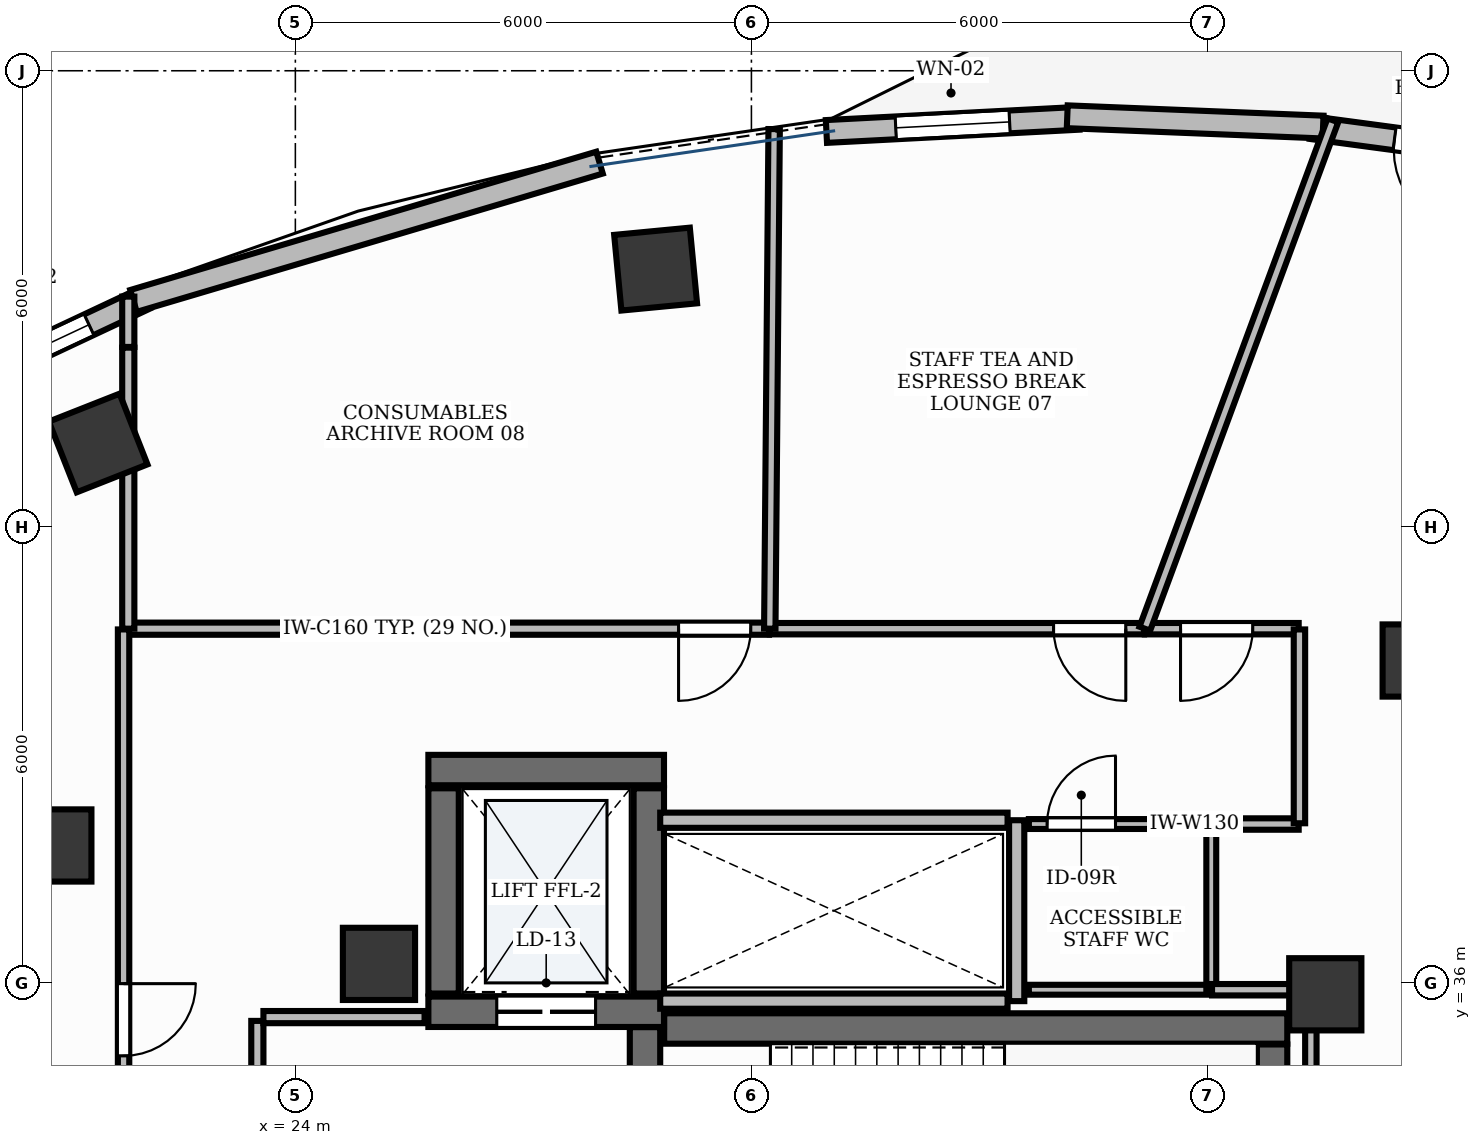
"""IFC4 building model, lengths in metres.
Left out: names, types, materials, properties, quantities, classifications, styles, units other than length and angle.
Written with IfcOpenShell. Run it as: python <this file> out.ifc"""

import sys

from ifc_helpers import new_model, si_unit, direction, frame, frame_2d, origin, origin_2d, place, context, subcontext, project, spatial, rectangle, extrude, element, fill, save


model = new_model("IFC4")
c1 = context("Model", 3, precision=1e-05, world=origin(), true_north=direction((0.0, 1.0)))
c2 = subcontext(c1, "Body", "Model", "MODEL_VIEW")
j1 = project(units=[si_unit("LENGTHUNIT", "METRE"), si_unit("PLANEANGLEUNIT", "RADIAN")], contexts=[c1])
p1 = place(None, origin())
s1 = spatial("IfcSite", under=j1, at=p1, CompositionType="ELEMENT")
p2 = place(p1, origin())
s2 = spatial("IfcBuilding", under=s1, at=p2, CompositionType="ELEMENT")
p3 = place(p2, frame((0.0, 0.0, 183.6)))
s3 = spatial("IfcBuildingStorey", under=s2, at=p3, CompositionType="ELEMENT", Elevation=183.6)
p4 = place(p3, frame((28.852, 35.4, 0.0), z_axis=(0.0, 0.0, 1.0), x_axis=(1.0, 0.0, 0.0)))
e1 = element("IfcWall", 1, at=p4, inside=s3, PredefinedType="SHEAR", context=c2, shape_type="SweptSolid", body=[
    extrude(rectangle(XDim=8.198, YDim=0.4, at=frame_2d((4.099, 0.0))), origin(), (0.0, 0.0, 1.0), 3.9),
])
p5 = place(p3, frame((36.85, 32.11, 0.0), z_axis=(0.0, 0.0, 1.0), x_axis=(0.0, 1.0, 0.0)))
e2 = element("IfcWall", 2, at=p5, inside=s3, PredefinedType="SHEAR", context=c2, shape_type="SweptSolid", body=[
    extrude(rectangle(XDim=3.08, YDim=0.4, at=frame_2d((1.54, 0.0))), origin(), (0.0, 0.0, 1.0), 3.9),
])
p6 = place(p3, frame((28.6, 32.11, 0.0), z_axis=(0.0, 0.0, 1.0), x_axis=(0.0, 1.0, 0.0)))
e3 = element("IfcWall", 3, at=p6, inside=s3, PredefinedType="SHEAR", context=c2, shape_type="SweptSolid", body=[
    extrude(rectangle(XDim=3.308, YDim=0.4, at=frame_2d((1.654, 0.0))), origin(), (0.0, 0.0, 1.0), 3.9),
])
p7 = place(p6, frame((0.2, 0.0, 0.0)))
e4 = element("IfcOpeningElement", 4, at=p7, cuts=e3, PredefinedType="OPENING", context=c2, shape_type="SweptSolid", body=[
    extrude(rectangle(XDim=1.05, YDim=2.15, at=frame_2d((0.525, 1.075))), frame((0.0, 0.215, 0.0), z_axis=(0.0, -1.0, 0.0), x_axis=(1.0, 0.0, 0.0)), (0.0, 0.0, 1.0), 0.43),
])
p8 = place(p3, frame((25.75, 38.8, 0.0), z_axis=(0.0, 0.0, 1.0), x_axis=(1.0, 0.0, 0.0)))
e5 = element("IfcWall", 5, at=p8, inside=s3, PredefinedType="SHEAR", context=c2, shape_type="SweptSolid", body=[
    extrude(rectangle(XDim=3.1, YDim=0.4, at=frame_2d((1.55, 0.0))), origin(), (0.0, 0.0, 1.0), 3.9),
])
p9 = place(p3, frame((25.75, 35.62, 0.0), z_axis=(0.0, 0.0, 1.0), x_axis=(1.0, 0.0, 0.0)))
e6 = element("IfcWall", 6, at=p9, inside=s3, PredefinedType="SHEAR", context=c2, shape_type="SweptSolid", body=[
    extrude(rectangle(XDim=3.1, YDim=0.4, at=frame_2d((1.55, 0.0))), origin(), (0.0, 0.0, 1.0), 3.9),
])
p10 = place(p9, frame((0.9, 0.0, 0.0)))
e7 = element("IfcOpeningElement", 7, at=p10, cuts=e6, PredefinedType="OPENING", context=c2, shape_type="SweptSolid", body=[
    extrude(rectangle(XDim=1.3, YDim=2.2, at=frame_2d((0.65, 1.1))), frame((0.0, 0.215, 0.0), z_axis=(0.0, -1.0, 0.0), x_axis=(1.0, 0.0, 0.0)), (0.0, 0.0, 1.0), 0.43),
])
for number, where, z_axis, x_axis in (
    (8, (25.95, 35.86, 0.0), (0.0, 0.0, 1.0), (0.0, 1.0, 0.0)),
    (9, (28.65, 35.86, 0.0), (0.0, 0.0, 1.0), (0.0, 1.0, 0.0)),
):
    element("IfcWall", number, at=place(p3, frame(where, z_axis=z_axis, x_axis=x_axis)), inside=s3, PredefinedType="SHEAR", context=c2, shape_type="SweptSolid", body=[
        extrude(rectangle(XDim=2.7, YDim=0.4, at=frame_2d((1.35, 0.0))), origin(), (0.0, 0.0, 1.0), 3.9),
    ])
for number, where, z_axis, x_axis in (
    (10, (37.55, 35.85, -0.0), (0.0, 0.0, 1.0), (1.0, 0.0, 0.0)),
    (11, (25.1, 36.25, -0.0), (0.0, 0.0, 1.0), (1.0, 0.0, 0.0)),
):
    element("IfcColumn", number, at=place(p3, frame(where, z_axis=z_axis, x_axis=x_axis)), inside=s3, PredefinedType="PILASTER", context=c2, shape_type="SweptSolid", body=[
        extrude(rectangle(XDim=0.95, YDim=0.95, at=origin_2d()), origin(), (0.0, 0.0, 1.0), 3.901),
    ])
p11 = place(p3, frame((38.779, 40.241, -0.0), z_axis=(0.0, 0.0, 1.0), x_axis=(1.0, 0.0, 0.0)))
e12 = element("IfcColumn", 12, at=p11, inside=s3, PredefinedType="COLUMN", context=c2, shape_type="SweptSolid", body=[
    extrude(rectangle(XDim=0.95, YDim=0.95, at=origin_2d()), origin(), (0.0, 0.0, 1.0), 3.901),
])
for number, where, z_axis, x_axis in (
    (13, (28.74, 45.39, -0.0), (0.0, 0.0, 1.0), (0.995, 0.095, 0.0)),
    (14, (21.406, 43.103, -0.0), (0.0, 0.0, 1.0), (0.93, 0.367, 0.0)),
):
    element("IfcColumn", number, at=place(p3, frame(where, z_axis=z_axis, x_axis=x_axis)), inside=s3, PredefinedType="COLUMN", context=c2, shape_type="SweptSolid", body=[
        extrude(rectangle(XDim=1.0, YDim=1.0, at=origin_2d()), origin(), (0.0, 0.0, 1.0), 3.901),
    ])
p12 = place(p3, frame((20.842, 37.808, -0.0), z_axis=(0.0, 0.0, 1.0), x_axis=(1.0, 0.0, 0.0)))
e15 = element("IfcColumn", 15, at=p12, inside=s3, PredefinedType="COLUMN", context=c2, shape_type="SweptSolid", body=[
    extrude(rectangle(XDim=0.95, YDim=0.95, at=origin_2d()), origin(), (0.0, 0.0, 1.0), 3.901),
])
p13 = place(p3, frame((40.646, 46.812, 0.0), z_axis=(0.0, 0.0, 1.0), x_axis=(-0.991139436205, 0.132825517122, 0.0)))
e16 = element("IfcWall", 16, at=p13, inside=s3, PredefinedType="STANDARD", context=c2, shape_type="SweptSolid", body=[
    extrude(rectangle(XDim=3.31, YDim=0.3, at=frame_2d((1.655, 0.0))), origin(), (0.0, 0.0, 1.0), 3.9),
])
p14 = place(p13, frame((1.105, 0.0, 0.0)))
e17 = element("IfcOpeningElement", 17, at=p14, cuts=e16, PredefinedType="OPENING", context=c2, shape_type="SweptSolid", body=[
    extrude(rectangle(XDim=1.1, YDim=2.15, at=frame_2d((0.55, 1.075))), frame((0.0, 0.165, 0.0), z_axis=(0.0, -1.0, 0.0), x_axis=(1.0, 0.0, 0.0)), (0.0, 0.0, 1.0), 0.33),
])
p15 = place(p3, frame((34.309, 47.375, 0.0), z_axis=(0.0, 0.0, 1.0), x_axis=(-0.998637826203, -0.05217750547, 0.0)))
e18 = element("IfcWall", 18, at=p15, inside=s3, PredefinedType="STANDARD", context=c2, shape_type="SweptSolid", body=[
    extrude(rectangle(XDim=3.327, YDim=0.3, at=frame_2d((1.664, 0.0))), origin(), (0.0, 0.0, 1.0), 3.9),
])
p16 = place(p15, frame((0.913, 0.0, 0.95)))
e19 = element("IfcOpeningElement", 19, at=p16, cuts=e18, PredefinedType="OPENING", context=c2, shape_type="SweptSolid", body=[
    extrude(rectangle(XDim=1.5, YDim=1.8, at=frame_2d((0.75, 0.9))), frame((0.0, 0.165, 0.0), z_axis=(0.0, -1.0, 0.0), x_axis=(1.0, 0.0, 0.0)), (0.0, 0.0, 1.0), 0.33),
])
p17 = place(p3, frame((22.03, 45.01, 0.0), z_axis=(0.0, 0.0, 1.0), x_axis=(-0.905013842092, -0.425382117186, 0.0)))
e20 = element("IfcWall", 20, at=p17, inside=s3, PredefinedType="STANDARD", context=c2, shape_type="SweptSolid", body=[
    extrude(rectangle(XDim=3.146, YDim=0.3, at=frame_2d((1.573, 0.0))), origin(), (0.0, 0.0, 1.0), 3.9),
])
p18 = place(p17, frame((0.823, 0.0, 0.95)))
e21 = element("IfcOpeningElement", 21, at=p18, cuts=e20, PredefinedType="OPENING", context=c2, shape_type="SweptSolid", body=[
    extrude(rectangle(XDim=1.5, YDim=1.8, at=frame_2d((0.75, 0.9))), frame((0.0, 0.165, 0.0), z_axis=(0.0, -1.0, 0.0), x_axis=(1.0, 0.0, 0.0)), (0.0, 0.0, 1.0), 0.33),
])
p19 = place(p3, frame((37.521, 47.259, 0.0), z_axis=(0.0, 0.0, 1.0), x_axis=(-0.999190386434, 0.040231475948, 0.0)))
e22 = element("IfcWall", 22, at=p19, inside=s3, PredefinedType="STANDARD", context=c2, shape_type="SweptSolid", body=[
    extrude(rectangle(XDim=3.368, YDim=0.3, at=frame_2d((1.684, 0.0))), origin(), (0.0, 0.0, 1.0), 3.9),
])
p20 = place(p3, frame((28.002, 46.791, 0.0), z_axis=(0.0, 0.0, 1.0), x_axis=(-0.958672086524, -0.284513322218, 0.0)))
e23 = element("IfcWall", 23, at=p20, inside=s3, PredefinedType="STANDARD", context=c2, shape_type="SweptSolid", body=[
    extrude(rectangle(XDim=6.396, YDim=0.3, at=frame_2d((3.198, 0.0))), origin(), (0.0, 0.0, 1.0), 3.47),
])
p21 = place(p3, frame((33.49, 35.76, 0.0), z_axis=(0.0, 0.0, 1.0), x_axis=(0.0, 1.0, 0.0)))
e24 = element("IfcWall", 24, at=p21, inside=s3, PredefinedType="PARTITIONING", context=c2, shape_type="SweptSolid", body=[
    extrude(rectangle(XDim=2.38, YDim=0.2, at=frame_2d((1.19, 0.0))), origin(), (0.0, 0.0, 1.0), 2.91),
])
for number, where, z_axis, x_axis in (
    (25, (28.8, 35.76, 0.0), (0.0, 0.0, 1.0), (1.0, 0.0, 0.0)),
    (26, (28.8, 38.14, 0.0), (0.0, 0.0, 1.0), (1.0, 0.0, 0.0)),
):
    element("IfcWall", number, at=place(p3, frame(where, z_axis=z_axis, x_axis=x_axis)), inside=s3, PredefinedType="PARTITIONING", context=c2, shape_type="SweptSolid", body=[
        extrude(rectangle(XDim=4.57, YDim=0.2, at=frame_2d((2.285, 0.0))), origin(), (0.0, 0.0, 1.0), 2.91),
    ])
p22 = place(p3, frame((23.5, 32.1, 0.0), z_axis=(0.0, 0.0, 1.0), x_axis=(0.0, 1.0, 0.0)))
e27 = element("IfcWall", 27, at=p22, inside=s3, PredefinedType="PARTITIONING", context=c2, shape_type="SweptSolid", body=[
    extrude(rectangle(XDim=3.4, YDim=0.16, at=frame_2d((1.7, 0.0))), origin(), (0.0, 0.0, 1.0), 2.91),
])
p23 = place(p22, frame((1.175, 0.0, 0.0)))
e28 = element("IfcOpeningElement", 28, at=p23, cuts=e27, PredefinedType="OPENING", context=c2, shape_type="SweptSolid", body=[
    extrude(rectangle(XDim=1.05, YDim=2.15, at=frame_2d((0.525, 1.075))), frame((0.0, 0.095, 0.0), z_axis=(0.0, -1.0, 0.0), x_axis=(1.0, 0.0, 0.0)), (0.0, 0.0, 1.0), 0.19),
])
p24 = place(p3, frame((23.58, 35.55, 0.0), z_axis=(0.0, 0.0, 1.0), x_axis=(1.0, 0.0, 0.0)))
e29 = element("IfcWall", 29, at=p24, inside=s3, PredefinedType="PARTITIONING", context=c2, shape_type="SweptSolid", body=[
    extrude(rectangle(XDim=2.12, YDim=0.16, at=frame_2d((1.06, 0.0))), origin(), (0.0, 0.0, 1.0), 2.91),
])
p25 = place(p3, frame((33.65, 38.09, 0.0), z_axis=(0.0, 0.0, 1.0), x_axis=(1.0, 0.0, 0.0)))
e30 = element("IfcWall", 30, at=p25, inside=s3, PredefinedType="PARTITIONING", context=c2, shape_type="SweptSolid", body=[
    extrude(rectangle(XDim=2.4, YDim=0.13, at=frame_2d((1.2, 0.0))), origin(), (0.0, 0.0, 1.0), 2.91),
])
p26 = place(p25, frame((0.24, 0.0, 0.0)))
e31 = element("IfcOpeningElement", 31, at=p26, cuts=e30, PredefinedType="OPENING", context=c2, shape_type="SweptSolid", body=[
    extrude(rectangle(XDim=0.9, YDim=2.15, at=frame_2d((0.45, 1.075))), frame((0.0, 0.08, 0.0), z_axis=(0.0, -1.0, 0.0), x_axis=(1.0, 0.0, 0.0)), (0.0, 0.0, 1.0), 0.16),
])
p27 = place(p3, frame((37.2, 40.66, 0.0), z_axis=(0.0, 0.0, 1.0), x_axis=(-1.0, 0.0, 0.0)))
e32 = element("IfcWall", 32, at=p27, inside=s3, PredefinedType="PARTITIONING", context=c2, shape_type="SweptSolid", body=[
    extrude(rectangle(XDim=2.024, YDim=0.15, at=frame_2d((1.012, 0.0))), origin(), (0.0, 0.0, 1.0), 2.91),
])
p28 = place(p27, frame((0.604, 0.0, 0.0)))
e33 = element("IfcOpeningElement", 33, at=p28, cuts=e32, PredefinedType="OPENING", context=c2, shape_type="SweptSolid", body=[
    extrude(rectangle(XDim=0.95, YDim=2.15, at=frame_2d((0.475, 1.075))), frame((0.0, 0.09, 0.0), z_axis=(0.0, -1.0, 0.0), x_axis=(1.0, 0.0, 0.0)), (0.0, 0.0, 1.0), 0.18),
])
p29 = place(p3, frame((35.166, 40.66, 0.0), z_axis=(0.0, 0.0, 1.0), x_axis=(-1.0, 0.0, 0.0)))
e34 = element("IfcWall", 34, at=p29, inside=s3, PredefinedType="PARTITIONING", context=c2, shape_type="SweptSolid", body=[
    extrude(rectangle(XDim=4.924, YDim=0.15, at=frame_2d((2.462, 0.0))), origin(), (0.0, 0.0, 1.0), 2.91),
])
p30 = place(p29, frame((0.24, 0.0, 0.0)))
e35 = element("IfcOpeningElement", 35, at=p30, cuts=e34, PredefinedType="OPENING", context=c2, shape_type="SweptSolid", body=[
    extrude(rectangle(XDim=0.95, YDim=2.15, at=frame_2d((0.475, 1.075))), frame((0.0, 0.09, 0.0), z_axis=(0.0, -1.0, 0.0), x_axis=(1.0, 0.0, 0.0)), (0.0, 0.0, 1.0), 0.18),
])
p31 = place(p3, frame((30.232, 40.66, 0.0), z_axis=(0.0, 0.0, 1.0), x_axis=(-1.0, 0.0, 0.0)))
e36 = element("IfcWall", 36, at=p31, inside=s3, PredefinedType="PARTITIONING", context=c2, shape_type="SweptSolid", body=[
    extrude(rectangle(XDim=8.43, YDim=0.16, at=frame_2d((4.215, 0.0))), origin(), (0.0, 0.0, 1.0), 2.91),
])
p32 = place(p31, frame((0.24, 0.0, 0.0)))
e37 = element("IfcOpeningElement", 37, at=p32, cuts=e36, PredefinedType="OPENING", context=c2, shape_type="SweptSolid", body=[
    extrude(rectangle(XDim=0.95, YDim=2.15, at=frame_2d((0.475, 1.075))), frame((0.0, 0.095, 0.0), z_axis=(0.0, -1.0, 0.0), x_axis=(1.0, 0.0, 0.0)), (0.0, 0.0, 1.0), 0.19),
])
p33 = place(p3, frame((21.74, 40.65, 0.0), z_axis=(0.0, 0.0, 1.0), x_axis=(0.0, -1.0, 0.0)))
e38 = element("IfcWall", 38, at=p33, inside=s3, PredefinedType="PARTITIONING", context=c2, shape_type="SweptSolid", body=[
    extrude(rectangle(XDim=5.85, YDim=0.15, at=frame_2d((2.925, 0.0))), origin(), (0.0, 0.0, 1.0), 2.91),
])
p34 = place(p33, frame((4.66, 0.0, 0.0)))
e39 = element("IfcOpeningElement", 39, at=p34, cuts=e38, PredefinedType="OPENING", context=c2, shape_type="SweptSolid", body=[
    extrude(rectangle(XDim=0.95, YDim=2.15, at=frame_2d((0.475, 1.075))), frame((0.0, 0.09, 0.0), z_axis=(0.0, -1.0, 0.0), x_axis=(1.0, 0.0, 0.0)), (0.0, 0.0, 1.0), 0.18),
])
p35 = place(p3, frame((36.05, 35.91, 0.0), z_axis=(0.0, 0.0, 1.0), x_axis=(-1.0, 0.0, 0.0)))
e40 = element("IfcWall", 40, at=p35, inside=s3, PredefinedType="PARTITIONING", context=c2, shape_type="SweptSolid", body=[
    extrude(rectangle(XDim=2.4, YDim=0.13, at=frame_2d((1.2, 0.0))), origin(), (0.0, 0.0, 1.0), 2.91),
])
p36 = place(p3, frame((36.05, 38.09, 0.0), z_axis=(0.0, 0.0, 1.0), x_axis=(0.0, -1.0, 0.0)))
e41 = element("IfcWall", 41, at=p36, inside=s3, PredefinedType="PARTITIONING", context=c2, shape_type="SweptSolid", body=[
    extrude(rectangle(XDim=2.18, YDim=0.13, at=frame_2d((1.09, 0.0))), origin(), (0.0, 0.0, 1.0), 2.91),
])
p37 = place(p3, frame((37.36, 31.702, 0.0), z_axis=(0.0, 0.0, 1.0), x_axis=(0.0, 1.0, 0.0)))
e42 = element("IfcWall", 42, at=p37, inside=s3, PredefinedType="PARTITIONING", context=c2, shape_type="SweptSolid", body=[
    extrude(rectangle(XDim=4.198, YDim=0.15, at=frame_2d((2.099, 0.0))), origin(), (0.0, 0.0, 1.0), 2.91),
])
p38 = place(p3, frame((37.35, 35.91, 0.0), z_axis=(0.0, 0.0, 1.0), x_axis=(-1.0, 0.0, 0.0)))
e43 = element("IfcWall", 43, at=p38, inside=s3, PredefinedType="PARTITIONING", context=c2, shape_type="SweptSolid", body=[
    extrude(rectangle(XDim=1.29, YDim=0.15, at=frame_2d((0.645, 0.0))), origin(), (0.0, 0.0, 1.0), 2.91),
])
p39 = place(p3, frame((36.06, 38.09, 0.0), z_axis=(0.0, 0.0, 1.0), x_axis=(1.0, 0.0, 0.0)))
e44 = element("IfcWall", 44, at=p39, inside=s3, PredefinedType="PARTITIONING", context=c2, shape_type="SweptSolid", body=[
    extrude(rectangle(XDim=1.14, YDim=0.15, at=frame_2d((0.57, 0.0))), origin(), (0.0, 0.0, 1.0), 2.91),
])
p40 = place(p3, frame((37.21, 38.1, 0.0), z_axis=(0.0, 0.0, 1.0), x_axis=(0.0, 1.0, 0.0)))
e45 = element("IfcWall", 45, at=p40, inside=s3, PredefinedType="PARTITIONING", context=c2, shape_type="SweptSolid", body=[
    extrude(rectangle(XDim=2.55, YDim=0.15, at=frame_2d((1.275, 0.0))), origin(), (0.0, 0.0, 1.0), 2.91),
])
p41 = place(p3, frame((35.176, 40.66, 0.0), z_axis=(0.0, 0.0, 1.0), x_axis=(0.346944137663, 0.937885795468, 0.0)))
e46 = element("IfcWall", 46, at=p41, inside=s3, PredefinedType="PARTITIONING", context=c2, shape_type="SweptSolid", body=[
    extrude(rectangle(XDim=7.131, YDim=0.15, at=frame_2d((3.565, 0.0))), origin(), (0.0, 0.0, 1.0), 2.91),
])
p42 = place(p3, frame((30.242, 40.66, 0.0), z_axis=(0.0, 0.0, 1.0), x_axis=(0.008728912263, 0.99996190232, 0.0)))
e47 = element("IfcWall", 47, at=p42, inside=s3, PredefinedType="PARTITIONING", context=c2, shape_type="SweptSolid", body=[
    extrude(rectangle(XDim=6.573, YDim=0.15, at=frame_2d((3.286, 0.0))), origin(), (0.0, 0.0, 1.0), 2.91),
])
p43 = place(p3, frame((21.802, 44.367, 0.0), z_axis=(0.0, 0.0, 1.0), x_axis=(0.0, 1.0, 0.0)))
e48 = element("IfcWall", 48, at=p43, inside=s3, PredefinedType="PARTITIONING", context=c2, shape_type="SweptSolid", body=[
    extrude(rectangle(XDim=0.662, YDim=0.16, at=frame_2d((0.331, 0.0))), origin(), (0.0, 0.0, 1.0), 2.91),
])
p44 = place(p3, frame((21.802, 40.66, 0.0), z_axis=(0.0, 0.0, 1.0), x_axis=(0.0, 1.0, 0.0)))
e49 = element("IfcWall", 49, at=p44, inside=s3, PredefinedType="PARTITIONING", context=c2, shape_type="SweptSolid", body=[
    extrude(rectangle(XDim=3.697, YDim=0.16, at=frame_2d((1.849, 0.0))), origin(), (0.0, 0.0, 1.0), 2.91),
])
p45 = place(p14, origin())
e50 = element("IfcDoor", 50, at=p45, inside=s3, OperationType="SINGLE_SWING_LEFT", PredefinedType="DOOR", context=c2, shape_type="SweptSolid", body=[
    extrude(rectangle(XDim=1.1, YDim=2.15, at=frame_2d((0.55, 1.075))), frame((0.0, 0.025, 0.0), z_axis=(0.0, -1.0, 0.0), x_axis=(1.0, 0.0, 0.0)), (0.0, 0.0, 1.0), 0.05),
])
fill(e17, e50)
p46 = place(p16, origin())
e51 = element("IfcWindow", 51, at=p46, inside=s3, PartitioningType="DOUBLE_PANEL_VERTICAL", PredefinedType="WINDOW", context=c2, shape_type="SweptSolid", body=[
    extrude(rectangle(XDim=1.5, YDim=1.8, at=frame_2d((0.75, 0.9))), frame((0.0, 0.03, 0.0), z_axis=(0.0, -1.0, 0.0), x_axis=(1.0, 0.0, 0.0)), (0.0, 0.0, 1.0), 0.06),
])
fill(e19, e51)
p47 = place(p18, origin())
e52 = element("IfcWindow", 52, at=p47, inside=s3, PartitioningType="DOUBLE_PANEL_VERTICAL", PredefinedType="WINDOW", context=c2, shape_type="SweptSolid", body=[
    extrude(rectangle(XDim=1.5, YDim=1.8, at=frame_2d((0.75, 0.9))), frame((0.0, 0.03, 0.0), z_axis=(0.0, -1.0, 0.0), x_axis=(1.0, 0.0, 0.0)), (0.0, 0.0, 1.0), 0.06),
])
fill(e21, e52)
p48 = place(p10, origin())
e53 = element("IfcDoor", 53, at=p48, inside=s3, OperationType="DOUBLE_DOOR_SLIDING", PredefinedType="DOOR", context=c2, shape_type="SweptSolid", body=[
    extrude(rectangle(XDim=1.3, YDim=2.2, at=frame_2d((0.65, 1.1))), frame((0.0, 0.025, 0.0), z_axis=(0.0, -1.0, 0.0), x_axis=(1.0, 0.0, 0.0)), (0.0, 0.0, 1.0), 0.05),
])
fill(e7, e53)
p49 = place(p26, origin())
e54 = element("IfcDoor", 54, at=p49, inside=s3, OperationType="SINGLE_SWING_RIGHT", PredefinedType="DOOR", context=c2, shape_type="SweptSolid", body=[
    extrude(rectangle(XDim=0.9, YDim=2.15, at=frame_2d((0.45, 1.075))), frame((0.0, 0.025, 0.0), z_axis=(0.0, -1.0, 0.0), x_axis=(1.0, 0.0, 0.0)), (0.0, 0.0, 1.0), 0.05),
])
fill(e31, e54)
p50 = place(p28, origin())
e55 = element("IfcDoor", 55, at=p50, inside=s3, OperationType="SINGLE_SWING_RIGHT", PredefinedType="DOOR", context=c2, shape_type="SweptSolid", body=[
    extrude(rectangle(XDim=0.95, YDim=2.15, at=frame_2d((0.475, 1.075))), frame((0.0, 0.025, 0.0), z_axis=(0.0, -1.0, 0.0), x_axis=(1.0, 0.0, 0.0)), (0.0, 0.0, 1.0), 0.05),
])
fill(e33, e55)
p51 = place(p30, origin())
e56 = element("IfcDoor", 56, at=p51, inside=s3, OperationType="SINGLE_SWING_LEFT", PredefinedType="DOOR", context=c2, shape_type="SweptSolid", body=[
    extrude(rectangle(XDim=0.95, YDim=2.15, at=frame_2d((0.475, 1.075))), frame((0.0, 0.025, 0.0), z_axis=(0.0, -1.0, 0.0), x_axis=(1.0, 0.0, 0.0)), (0.0, 0.0, 1.0), 0.05),
])
fill(e35, e56)
p52 = place(p32, origin())
e57 = element("IfcDoor", 57, at=p52, inside=s3, OperationType="SINGLE_SWING_RIGHT", PredefinedType="DOOR", context=c2, shape_type="SweptSolid", body=[
    extrude(rectangle(XDim=0.95, YDim=2.15, at=frame_2d((0.475, 1.075))), frame((0.0, 0.025, 0.0), z_axis=(0.0, -1.0, 0.0), x_axis=(1.0, 0.0, 0.0)), (0.0, 0.0, 1.0), 0.05),
])
fill(e37, e57)
p53 = place(p34, origin())
e58 = element("IfcDoor", 58, at=p53, inside=s3, OperationType="SINGLE_SWING_LEFT", PredefinedType="DOOR", context=c2, shape_type="SweptSolid", body=[
    extrude(rectangle(XDim=0.95, YDim=2.15, at=frame_2d((0.475, 1.075))), frame((0.0, 0.025, 0.0), z_axis=(0.0, -1.0, 0.0), x_axis=(1.0, 0.0, 0.0)), (0.0, 0.0, 1.0), 0.05),
])
fill(e39, e58)
save(model, sys.argv[1])
